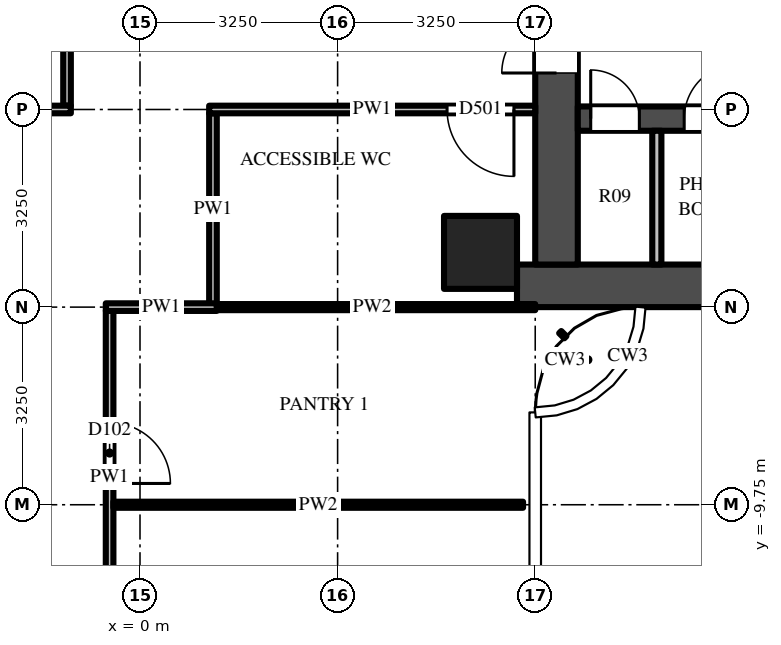
"""IFC4 building model, lengths in metres.
Left out: names, types, materials, properties, quantities, classifications, styles, units other than length and angle.
Written with IfcOpenShell. Run it as: python <this file> out.ifc"""

import sys

from ifc_helpers import new_model, si_unit, direction, frame, frame_2d, origin, origin_2d, place, context, subcontext, project, spatial, rectangle, extrude, source, transform, mapped, element, fill, save


model = new_model("IFC4")
c1 = context("Model", 3, precision=1e-05, world=origin(), true_north=direction((0.0, 1.0)))
c2 = subcontext(c1, "Body", "Model", "MODEL_VIEW")
j1 = project(units=[si_unit("LENGTHUNIT", "METRE"), si_unit("PLANEANGLEUNIT", "RADIAN")], contexts=[c1])
p1 = place(None, origin())
s1 = spatial("IfcSite", under=j1, at=p1, CompositionType="ELEMENT")
p2 = place(p1, origin())
s2 = spatial("IfcBuilding", under=s1, at=p2, CompositionType="ELEMENT")
p3 = place(p2, frame((0.0, 0.0, 193.2)))
s3 = spatial("IfcBuildingStorey", under=s2, at=p3, CompositionType="ELEMENT", Elevation=193.2)
m1 = source(origin(), c2, "Body", "SweptSolid", [
    extrude(rectangle(XDim=1.2, YDim=1.2, at=origin_2d()), origin(), (0.0, 0.0, 1.0), 3.9),
])
p4 = place(p3, frame((5.6, -5.6, 0.0), z_axis=(0.0, 0.0, 1.0), x_axis=(1.0, 0.0, 0.0)))
e1 = element("IfcColumn", 1, at=p4, inside=s3, PredefinedType="COLUMN", context=c2, shape_type="MappedRepresentation", body=[
    mapped(m1, transform((0.0, 0.0, 0.0))),
])
m2 = source(origin(), c2, "Body", "SweptSolid", [
    extrude(rectangle(XDim=16.55, YDim=0.7, at=frame_2d((8.275, 0.0))), origin(), (0.0, 0.0, 1.0), 3.7),
])
p5 = place(p3, frame((6.2, -6.15, 0.0), z_axis=(0.0, 0.0, 1.0), x_axis=(1.0, 0.0, 0.0)))
e2 = element("IfcWall", 2, at=p5, inside=s3, PredefinedType="SHEAR", context=c2, shape_type="MappedRepresentation", body=[
    mapped(m2, transform((0.0, 0.0, 0.0))),
])
m3 = source(origin(), c2, "Body", "SweptSolid", [
    extrude(rectangle(XDim=9.05, YDim=0.7, at=frame_2d((4.525, 0.0))), origin(), (0.0, 0.0, 1.0), 3.7),
])
p6 = place(p3, frame((6.85, -5.8, 0.0), z_axis=(0.0, 0.0, 1.0), x_axis=(0.0, 1.0, 0.0)))
e3 = element("IfcWall", 3, at=p6, inside=s3, PredefinedType="SHEAR", context=c2, shape_type="MappedRepresentation", body=[
    mapped(m3, transform((0.0, 0.0, 0.0))),
])
m4 = source(origin(), c2, "Body", "SweptSolid", [
    extrude(rectangle(XDim=1.8, YDim=2.1, at=frame_2d((0.9, 1.05))), frame((0.0, 0.36, 0.0), z_axis=(0.0, -1.0, 0.0), x_axis=(1.0, 0.0, 0.0)), (0.0, 0.0, 1.0), 0.72),
])
p7 = place(p6, frame((3.15, 0.0, 0.0)))
e4 = element("IfcOpeningElement", 4, at=p7, cuts=e3, PredefinedType="OPENING", context=c2, shape_type="MappedRepresentation", body=[
    mapped(m4, transform((0.0, 0.0, 0.0))),
])
m5 = source(origin(), c2, "Body", "SweptSolid", [
    extrude(rectangle(XDim=7.5, YDim=0.4, at=frame_2d((3.75, 0.0))), origin(), (0.0, 0.0, 1.0), 3.7),
])
p8 = place(p3, frame((7.2, -3.4, 0.0), z_axis=(0.0, 0.0, 1.0), x_axis=(1.0, 0.0, 0.0)))
e5 = element("IfcWall", 5, at=p8, inside=s3, PredefinedType="SHEAR", context=c2, shape_type="MappedRepresentation", body=[
    mapped(m5, transform((0.0, 0.0, 0.0))),
])
m6 = source(origin(), c2, "Body", "SweptSolid", [
    extrude(rectangle(XDim=0.8, YDim=2.1, at=frame_2d((0.4, 1.05))), frame((0.0, 0.21, 0.0), z_axis=(0.0, -1.0, 0.0), x_axis=(1.0, 0.0, 0.0)), (0.0, 0.0, 1.0), 0.42),
])
p9 = place(p8, frame((0.212, 0.0, 0.0)))
e6 = element("IfcOpeningElement", 6, at=p9, cuts=e5, PredefinedType="OPENING", context=c2, shape_type="MappedRepresentation", body=[
    mapped(m6, transform((0.0, 0.0, 0.0))),
])
m7 = source(origin(), c2, "Body", "SweptSolid", [
    extrude(rectangle(XDim=0.9, YDim=2.1, at=frame_2d((0.45, 1.05))), frame((0.0, 0.21, 0.0), z_axis=(0.0, -1.0, 0.0), x_axis=(1.0, 0.0, 0.0)), (0.0, 0.0, 1.0), 0.42),
])
p10 = place(p8, frame((1.75, 0.0, 0.0)))
e7 = element("IfcOpeningElement", 7, at=p10, cuts=e5, PredefinedType="OPENING", context=c2, shape_type="MappedRepresentation", body=[
    mapped(m7, transform((0.0, 0.0, 0.0))),
])
m8 = source(origin(), c2, "Body", "SweptSolid", [
    extrude(rectangle(XDim=1.0, YDim=2.1, at=frame_2d((0.5, 1.05))), frame((0.0, 0.21, 0.0), z_axis=(0.0, -1.0, 0.0), x_axis=(1.0, 0.0, 0.0)), (0.0, 0.0, 1.0), 0.42),
])
p11 = place(p8, frame((4.637, 0.0, 0.0)))
e8 = element("IfcOpeningElement", 8, at=p11, cuts=e5, PredefinedType="OPENING", context=c2, shape_type="MappedRepresentation", body=[
    mapped(m8, transform((0.0, 0.0, 0.0))),
])
m9 = source(origin(), c2, "Body", "SweptSolid", [
    extrude(rectangle(XDim=2.2, YDim=0.15, at=frame_2d((1.1, 0.0))), origin(), (0.0, 0.0, 1.0), 3.7),
])
p12 = place(p3, frame((8.5, -5.8, 0.0), z_axis=(0.0, 0.0, 1.0), x_axis=(0.0, 1.0, 0.0)))
e9 = element("IfcWall", 9, at=p12, inside=s3, PredefinedType="PARTITIONING", context=c2, shape_type="MappedRepresentation", body=[
    mapped(m9, transform((0.0, 0.0, 0.0))),
])
m10 = source(origin(), c2, "Body", "SweptSolid", [
    extrude(rectangle(XDim=3.125, YDim=0.125, at=frame_2d((1.562, 0.0))), origin(), (0.0, 0.0, 1.0), 3.068),
])
p13 = place(p3, frame((-1.2, -0.062, 0.0), z_axis=(0.0, 0.0, 1.0), x_axis=(0.0, -1.0, 0.0)))
e10 = element("IfcWall", 10, at=p13, inside=s3, PredefinedType="PARTITIONING", context=c2, shape_type="MappedRepresentation", body=[
    mapped(m10, transform((0.0, 0.0, 0.0))),
])
m11 = source(origin(), c2, "Body", "SweptSolid", [
    extrude(rectangle(XDim=5.475, YDim=0.125, at=frame_2d((2.738, 0.0))), origin(), (0.0, 0.0, 1.0), 2.997),
])
p14 = place(p3, frame((-0.5, -6.562, 0.0), z_axis=(0.0, 0.0, 1.0), x_axis=(0.0, -1.0, 0.0)))
e11 = element("IfcWall", 11, at=p14, inside=s3, PredefinedType="PARTITIONING", context=c2, shape_type="MappedRepresentation", body=[
    mapped(m11, transform((0.0, 0.0, 0.0))),
])
m12 = source(origin(), c2, "Body", "SweptSolid", [
    extrude(rectangle(XDim=1.0, YDim=2.1, at=frame_2d((0.5, 1.05))), frame((0.0, 0.073, 0.0), z_axis=(0.0, -1.0, 0.0), x_axis=(1.0, 0.0, 0.0)), (0.0, 0.0, 1.0), 0.145),
])
p15 = place(p14, frame((1.837, 0.0, 0.0)))
e12 = element("IfcOpeningElement", 12, at=p15, cuts=e11, PredefinedType="OPENING", context=c2, shape_type="MappedRepresentation", body=[
    mapped(m12, transform((0.0, 0.0, 0.0))),
])
m13 = source(origin(), c2, "Body", "SweptSolid", [
    extrude(rectangle(XDim=3.137, YDim=0.125, at=frame_2d((1.569, 0.0))), origin(), (0.0, 0.0, 1.0), 2.997),
])
p16 = place(p3, frame((1.2, -3.312, 0.0), z_axis=(0.0, 0.0, 1.0), x_axis=(0.0, -1.0, 0.0)))
e13 = element("IfcWall", 13, at=p16, inside=s3, PredefinedType="PARTITIONING", context=c2, shape_type="MappedRepresentation", body=[
    mapped(m13, transform((0.0, 0.0, 0.0))),
])
m14 = source(origin(), c2, "Body", "SweptSolid", [
    extrude(rectangle(XDim=6.738, YDim=0.1, at=frame_2d((3.369, 0.0))), origin(), (0.0, 0.0, 1.0), 2.78),
])
p17 = place(p3, frame((-0.438, -9.75, 0.0), z_axis=(0.0, 0.0, 1.0), x_axis=(1.0, 0.0, 0.0)))
e14 = element("IfcWall", 14, at=p17, inside=s3, PredefinedType="PARTITIONING", context=c2, shape_type="MappedRepresentation", body=[
    mapped(m14, transform((0.0, 0.0, 0.0))),
])
m15 = source(origin(), c2, "Body", "SweptSolid", [
    extrude(rectangle(XDim=5.363, YDim=0.1, at=frame_2d((2.681, 0.0))), origin(), (0.0, 0.0, 1.0), 2.78),
])
p18 = place(p3, frame((1.137, -6.5, 0.0), z_axis=(0.0, 0.0, 1.0), x_axis=(1.0, 0.0, 0.0)))
e15 = element("IfcWall", 15, at=p18, inside=s3, PredefinedType="PARTITIONING", context=c2, shape_type="MappedRepresentation", body=[
    mapped(m15, transform((0.0, 0.0, 0.0))),
])
m16 = source(origin(), c2, "Body", "SweptSolid", [
    extrude(rectangle(XDim=1.825, YDim=0.125, at=frame_2d((0.913, 0.0))), origin(), (0.0, 0.0, 1.0), 3.7),
])
p19 = place(p3, frame((1.262, -6.5, 0.0), z_axis=(0.0, 0.0, 1.0), x_axis=(-1.0, 0.0, 0.0)))
e16 = element("IfcWall", 16, at=p19, inside=s3, PredefinedType="PARTITIONING", context=c2, shape_type="MappedRepresentation", body=[
    mapped(m16, transform((0.0, 0.0, 0.0))),
])
m17 = source(origin(), c2, "Body", "SweptSolid", [
    extrude(rectangle(XDim=5.363, YDim=0.125, at=frame_2d((2.681, 0.0))), origin(), (0.0, 0.0, 1.0), 2.997),
])
p20 = place(p3, frame((-1.137, -3.25, 0.0), z_axis=(0.0, 0.0, 1.0), x_axis=(-1.0, 0.0, 0.0)))
e17 = element("IfcWall", 17, at=p20, inside=s3, PredefinedType="PARTITIONING", context=c2, shape_type="MappedRepresentation", body=[
    mapped(m17, transform((0.0, 0.0, 0.0))),
])
p21 = place(p20, frame((4.012, 0.0, 0.0)))
e18 = element("IfcOpeningElement", 18, at=p21, cuts=e17, PredefinedType="OPENING", context=c2, shape_type="MappedRepresentation", body=[
    mapped(m12, transform((0.0, 0.0, 0.0))),
])
p22 = place(p3, frame((6.5, -3.25, 0.0), z_axis=(0.0, 0.0, 1.0), x_axis=(-1.0, 0.0, 0.0)))
e19 = element("IfcWall", 19, at=p22, inside=s3, PredefinedType="PARTITIONING", context=c2, shape_type="MappedRepresentation", body=[
    mapped(m17, transform((0.0, 0.0, 0.0))),
])
m18 = source(origin(), c2, "Body", "SweptSolid", [
    extrude(rectangle(XDim=1.1, YDim=2.1, at=frame_2d((0.55, 1.05))), frame((0.0, 0.073, 0.0), z_axis=(0.0, -1.0, 0.0), x_axis=(1.0, 0.0, 0.0)), (0.0, 0.0, 1.0), 0.145),
])
p23 = place(p22, frame((0.35, 0.0, 0.0)))
e20 = element("IfcOpeningElement", 20, at=p23, cuts=e19, PredefinedType="OPENING", context=c2, shape_type="MappedRepresentation", body=[
    mapped(m18, transform((0.0, 0.0, 0.0))),
])
m19 = source(origin(), c2, "Body", "SweptSolid", [
    extrude(rectangle(XDim=1.8, YDim=2.1, at=frame_2d((0.9, 1.05))), frame((0.0, -0.275, 0.0), z_axis=(0.0, -1.0, 0.0), x_axis=(1.0, 0.0, 0.0)), (0.0, 0.0, 1.0), 0.05),
])
p24 = place(p7, origin())
e21 = element("IfcDoor", 21, at=p24, inside=s3, OperationType="DOUBLE_DOOR_SINGLE_SWING", PredefinedType="DOOR", context=c2, shape_type="MappedRepresentation", body=[
    mapped(m19, transform((0.0, 0.0, 0.0))),
])
fill(e4, e21)
m20 = source(origin(), c2, "Body", "SweptSolid", [
    extrude(rectangle(XDim=0.8, YDim=2.1, at=frame_2d((0.4, 1.05))), frame((0.0, 0.025, 0.0), z_axis=(0.0, -1.0, 0.0), x_axis=(1.0, 0.0, 0.0)), (0.0, 0.0, 1.0), 0.05),
])
p25 = place(p9, origin())
e22 = element("IfcDoor", 22, at=p25, inside=s3, OperationType="SINGLE_SWING_LEFT", PredefinedType="DOOR", context=c2, shape_type="MappedRepresentation", body=[
    mapped(m20, transform((0.0, 0.0, 0.0))),
])
fill(e6, e22)
m21 = source(origin(), c2, "Body", "SweptSolid", [
    extrude(rectangle(XDim=0.9, YDim=2.1, at=frame_2d((0.45, 1.05))), frame((0.0, 0.025, 0.0), z_axis=(0.0, -1.0, 0.0), x_axis=(1.0, 0.0, 0.0)), (0.0, 0.0, 1.0), 0.05),
])
p26 = place(p10, origin())
e23 = element("IfcDoor", 23, at=p26, inside=s3, OperationType="SINGLE_SWING_RIGHT", PredefinedType="DOOR", context=c2, shape_type="MappedRepresentation", body=[
    mapped(m21, transform((0.0, 0.0, 0.0))),
])
fill(e7, e23)
m22 = source(origin(), c2, "Body", "SweptSolid", [
    extrude(rectangle(XDim=1.0, YDim=2.1, at=frame_2d((0.5, 1.05))), frame((0.0, 0.025, 0.0), z_axis=(0.0, -1.0, 0.0), x_axis=(1.0, 0.0, 0.0)), (0.0, 0.0, 1.0), 0.05),
])
p27 = place(p15, origin())
e24 = element("IfcDoor", 24, at=p27, inside=s3, OperationType="SINGLE_SWING_RIGHT", PredefinedType="DOOR", context=c2, shape_type="MappedRepresentation", body=[
    mapped(m22, transform((0.0, 0.0, 0.0))),
])
fill(e12, e24)
m23 = source(origin(), c2, "Body", "SweptSolid", [
    extrude(rectangle(XDim=1.1, YDim=2.1, at=frame_2d((0.55, 1.05))), frame((0.0, 0.025, 0.0), z_axis=(0.0, -1.0, 0.0), x_axis=(1.0, 0.0, 0.0)), (0.0, 0.0, 1.0), 0.05),
])
p28 = place(p23, origin())
e25 = element("IfcDoor", 25, at=p28, inside=s3, OperationType="SINGLE_SWING_LEFT", PredefinedType="DOOR", context=c2, shape_type="MappedRepresentation", body=[
    mapped(m23, transform((0.0, 0.0, 0.0))),
])
fill(e20, e25)
save(model, sys.argv[1])
